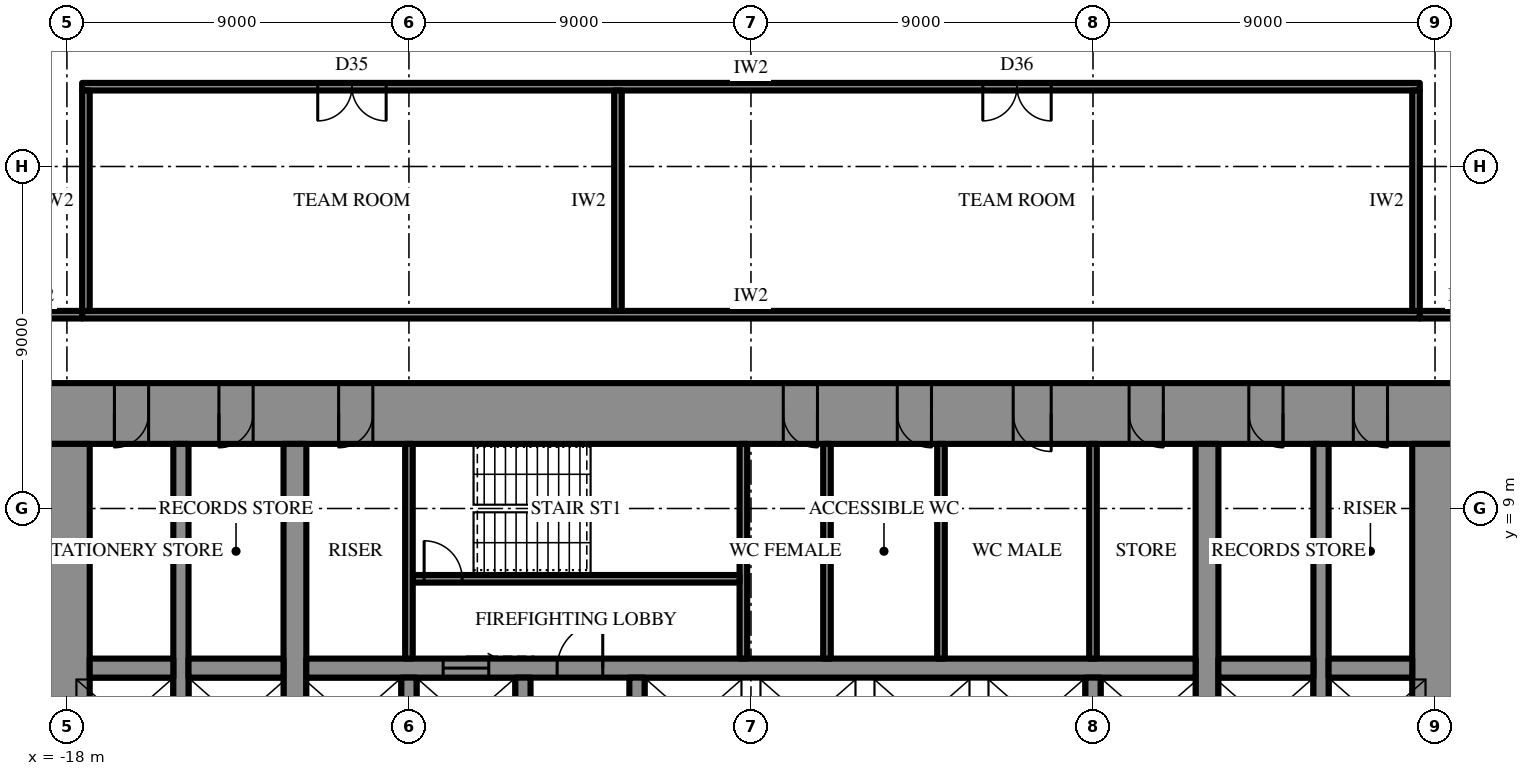
"""IFC4 building model, lengths in metres.
Left out: names, types, materials, properties, quantities, classifications, styles, units other than length and angle.
Written with IfcOpenShell. Run it as: python <this file> out.ifc"""

import sys

from ifc_helpers import new_model, si_unit, direction, frame, frame_2d, origin, place, context, subcontext, project, spatial, rectangle, extrude, element, fill, save


model = new_model("IFC4")
c1 = context("Model", 3, precision=1e-05, world=origin(), true_north=direction((0.0, 1.0)))
c2 = subcontext(c1, "Body", "Model", "MODEL_VIEW")
j1 = project(units=[si_unit("LENGTHUNIT", "METRE"), si_unit("PLANEANGLEUNIT", "RADIAN")], contexts=[c1])
p1 = place(None, origin())
s1 = spatial("IfcSite", under=j1, at=p1, CompositionType="ELEMENT")
p2 = place(p1, origin())
s2 = spatial("IfcBuilding", under=s1, at=p2, CompositionType="ELEMENT")
p3 = place(p2, frame((0.0, 0.0, 23.5)))
s3 = spatial("IfcBuildingStorey", under=s2, at=p3, CompositionType="ELEMENT", Elevation=23.5)
p4 = place(p3, frame((-18.6, 11.5, 0.0), z_axis=(0.0, 0.0, 1.0), x_axis=(1.0, 0.0, 0.0)))
e1 = element("IfcWall", 1, at=p4, inside=s3, PredefinedType="SHEAR", context=c2, shape_type="SweptSolid", body=[
    extrude(rectangle(XDim=37.2, YDim=1.6, at=frame_2d((18.6, 0.0))), origin(), (0.0, 0.0, 1.0), 4.2),
])
p5 = place(p4, frame((19.45, 0.0, 0.0)))
e2 = element("IfcOpeningElement", 2, at=p5, cuts=e1, PredefinedType="OPENING", context=c2, shape_type="SweptSolid", body=[
    extrude(rectangle(XDim=0.9, YDim=2.2, at=frame_2d((0.45, 1.1))), frame((0.0, 0.81, 0.0), z_axis=(0.0, -1.0, 0.0), x_axis=(1.0, 0.0, 0.0)), (0.0, 0.0, 1.0), 1.62),
])
p6 = place(p4, frame((22.45, 0.0, 0.0)))
e3 = element("IfcOpeningElement", 3, at=p6, cuts=e1, PredefinedType="OPENING", context=c2, shape_type="SweptSolid", body=[
    extrude(rectangle(XDim=0.9, YDim=2.2, at=frame_2d((0.45, 1.1))), frame((0.0, 0.81, 0.0), z_axis=(0.0, -1.0, 0.0), x_axis=(1.0, 0.0, 0.0)), (0.0, 0.0, 1.0), 1.62),
])
p7 = place(p4, frame((25.5, 0.0, 0.0)))
e4 = element("IfcOpeningElement", 4, at=p7, cuts=e1, PredefinedType="OPENING", context=c2, shape_type="SweptSolid", body=[
    extrude(rectangle(XDim=1.0, YDim=2.2, at=frame_2d((0.5, 1.1))), frame((0.0, 0.81, 0.0), z_axis=(0.0, -1.0, 0.0), x_axis=(1.0, 0.0, 0.0)), (0.0, 0.0, 1.0), 1.62),
])
p8 = place(p4, frame((1.85, 0.0, 0.0)))
e5 = element("IfcOpeningElement", 5, at=p8, cuts=e1, PredefinedType="OPENING", context=c2, shape_type="SweptSolid", body=[
    extrude(rectangle(XDim=0.9, YDim=2.2, at=frame_2d((0.45, 1.1))), frame((0.0, 0.81, 0.0), z_axis=(0.0, -1.0, 0.0), x_axis=(1.0, 0.0, 0.0)), (0.0, 0.0, 1.0), 1.62),
])
p9 = place(p4, frame((4.6, 0.0, 0.0)))
e6 = element("IfcOpeningElement", 6, at=p9, cuts=e1, PredefinedType="OPENING", context=c2, shape_type="SweptSolid", body=[
    extrude(rectangle(XDim=0.9, YDim=2.2, at=frame_2d((0.45, 1.1))), frame((0.0, 0.81, 0.0), z_axis=(0.0, -1.0, 0.0), x_axis=(1.0, 0.0, 0.0)), (0.0, 0.0, 1.0), 1.62),
])
p10 = place(p4, frame((7.75, 0.0, 0.0)))
e7 = element("IfcOpeningElement", 7, at=p10, cuts=e1, PredefinedType="OPENING", context=c2, shape_type="SweptSolid", body=[
    extrude(rectangle(XDim=0.9, YDim=2.2, at=frame_2d((0.45, 1.1))), frame((0.0, 0.81, 0.0), z_axis=(0.0, -1.0, 0.0), x_axis=(1.0, 0.0, 0.0)), (0.0, 0.0, 1.0), 1.62),
])
p11 = place(p4, frame((28.55, 0.0, 0.0)))
e8 = element("IfcOpeningElement", 8, at=p11, cuts=e1, PredefinedType="OPENING", context=c2, shape_type="SweptSolid", body=[
    extrude(rectangle(XDim=0.9, YDim=2.2, at=frame_2d((0.45, 1.1))), frame((0.0, 0.81, 0.0), z_axis=(0.0, -1.0, 0.0), x_axis=(1.0, 0.0, 0.0)), (0.0, 0.0, 1.0), 1.62),
])
p12 = place(p4, frame((31.7, 0.0, 0.0)))
e9 = element("IfcOpeningElement", 9, at=p12, cuts=e1, PredefinedType="OPENING", context=c2, shape_type="SweptSolid", body=[
    extrude(rectangle(XDim=0.9, YDim=2.2, at=frame_2d((0.45, 1.1))), frame((0.0, 0.81, 0.0), z_axis=(0.0, -1.0, 0.0), x_axis=(1.0, 0.0, 0.0)), (0.0, 0.0, 1.0), 1.62),
])
p13 = place(p4, frame((34.45, 0.0, 0.0)))
e10 = element("IfcOpeningElement", 10, at=p13, cuts=e1, PredefinedType="OPENING", context=c2, shape_type="SweptSolid", body=[
    extrude(rectangle(XDim=0.9, YDim=2.2, at=frame_2d((0.45, 1.1))), frame((0.0, 0.81, 0.0), z_axis=(0.0, -1.0, 0.0), x_axis=(1.0, 0.0, 0.0)), (0.0, 0.0, 1.0), 1.62),
])
p14 = place(p3, frame((18.0, -10.7, 0.0), z_axis=(0.0, 0.0, 1.0), x_axis=(0.0, 1.0, 0.0)))
e11 = element("IfcWall", 11, at=p14, inside=s3, PredefinedType="SHEAR", context=c2, shape_type="SweptSolid", body=[
    extrude(rectangle(XDim=21.4, YDim=1.2, at=frame_2d((10.7, 0.0))), origin(), (0.0, 0.0, 1.0), 4.2),
])
p15 = place(p14, frame((9.8, 0.0, 0.0)))
e12 = element("IfcOpeningElement", 12, at=p15, cuts=e11, PredefinedType="OPENING", context=c2, shape_type="SweptSolid", body=[
    extrude(rectangle(XDim=1.8, YDim=2.4, at=frame_2d((0.9, 1.2))), frame((0.0, 0.61, 0.0), z_axis=(0.0, -1.0, 0.0), x_axis=(1.0, 0.0, 0.0)), (0.0, 0.0, 1.0), 1.22),
])
p16 = place(p3, frame((-18.0, 10.7, 0.0), z_axis=(0.0, 0.0, 1.0), x_axis=(0.0, -1.0, 0.0)))
e13 = element("IfcWall", 13, at=p16, inside=s3, PredefinedType="SHEAR", context=c2, shape_type="SweptSolid", body=[
    extrude(rectangle(XDim=21.4, YDim=1.2, at=frame_2d((10.7, 0.0))), origin(), (0.0, 0.0, 1.0), 4.2),
])
p17 = place(p16, frame((9.8, 0.0, 0.0)))
e14 = element("IfcOpeningElement", 14, at=p17, cuts=e13, PredefinedType="OPENING", context=c2, shape_type="SweptSolid", body=[
    extrude(rectangle(XDim=1.8, YDim=2.4, at=frame_2d((0.9, 1.2))), frame((0.0, 0.61, 0.0), z_axis=(0.0, -1.0, 0.0), x_axis=(1.0, 0.0, 0.0)), (0.0, 0.0, 1.0), 1.22),
])
p18 = place(p3, frame((12.0, -10.7, 0.0), z_axis=(0.0, 0.0, 1.0), x_axis=(0.0, 1.0, 0.0)))
e15 = element("IfcWall", 15, at=p18, inside=s3, PredefinedType="SHEAR", context=c2, shape_type="SweptSolid", body=[
    extrude(rectangle(XDim=21.4, YDim=0.6, at=frame_2d((10.7, 0.0))), origin(), (0.0, 0.0, 1.0), 4.2),
])
p19 = place(p18, frame((9.8, 0.0, 0.0)))
e16 = element("IfcOpeningElement", 16, at=p19, cuts=e15, PredefinedType="OPENING", context=c2, shape_type="SweptSolid", body=[
    extrude(rectangle(XDim=1.8, YDim=2.4, at=frame_2d((0.9, 1.2))), frame((0.0, 0.31, 0.0), z_axis=(0.0, -1.0, 0.0), x_axis=(1.0, 0.0, 0.0)), (0.0, 0.0, 1.0), 0.62),
])
p20 = place(p3, frame((-12.0, -10.7, 0.0), z_axis=(0.0, 0.0, 1.0), x_axis=(0.0, 1.0, 0.0)))
e17 = element("IfcWall", 17, at=p20, inside=s3, PredefinedType="SHEAR", context=c2, shape_type="SweptSolid", body=[
    extrude(rectangle(XDim=21.4, YDim=0.6, at=frame_2d((10.7, 0.0))), origin(), (0.0, 0.0, 1.0), 4.2),
])
p21 = place(p20, frame((9.8, 0.0, 0.0)))
e18 = element("IfcOpeningElement", 18, at=p21, cuts=e17, PredefinedType="OPENING", context=c2, shape_type="SweptSolid", body=[
    extrude(rectangle(XDim=1.8, YDim=2.4, at=frame_2d((0.9, 1.2))), frame((0.0, 0.31, 0.0), z_axis=(0.0, -1.0, 0.0), x_axis=(1.0, 0.0, 0.0)), (0.0, 0.0, 1.0), 0.62),
])
p22 = place(p3, frame((15.0, -10.7, 0.0), z_axis=(0.0, 0.0, 1.0), x_axis=(0.0, 1.0, 0.0)))
e19 = element("IfcWall", 19, at=p22, inside=s3, PredefinedType="SHEAR", context=c2, shape_type="SweptSolid", body=[
    extrude(rectangle(XDim=21.4, YDim=0.4, at=frame_2d((10.7, 0.0))), origin(), (0.0, 0.0, 1.0), 4.2),
])
p23 = place(p22, frame((9.8, 0.0, 0.0)))
e20 = element("IfcOpeningElement", 20, at=p23, cuts=e19, PredefinedType="OPENING", context=c2, shape_type="SweptSolid", body=[
    extrude(rectangle(XDim=1.8, YDim=2.4, at=frame_2d((0.9, 1.2))), frame((0.0, 0.21, 0.0), z_axis=(0.0, -1.0, 0.0), x_axis=(1.0, 0.0, 0.0)), (0.0, 0.0, 1.0), 0.42),
])
p24 = place(p3, frame((-15.0, -10.7, 0.0), z_axis=(0.0, 0.0, 1.0), x_axis=(0.0, 1.0, 0.0)))
e21 = element("IfcWall", 21, at=p24, inside=s3, PredefinedType="SHEAR", context=c2, shape_type="SweptSolid", body=[
    extrude(rectangle(XDim=21.4, YDim=0.4, at=frame_2d((10.7, 0.0))), origin(), (0.0, 0.0, 1.0), 4.2),
])
p25 = place(p24, frame((9.8, 0.0, 0.0)))
e22 = element("IfcOpeningElement", 22, at=p25, cuts=e21, PredefinedType="OPENING", context=c2, shape_type="SweptSolid", body=[
    extrude(rectangle(XDim=1.8, YDim=2.4, at=frame_2d((0.9, 1.2))), frame((0.0, 0.21, 0.0), z_axis=(0.0, -1.0, 0.0), x_axis=(1.0, 0.0, 0.0)), (0.0, 0.0, 1.0), 0.42),
])
p26 = place(p3, frame((-17.4, 4.8, 0.0), z_axis=(0.0, 0.0, 1.0), x_axis=(1.0, 0.0, 0.0)))
e23 = element("IfcWall", 23, at=p26, inside=s3, PredefinedType="SHEAR", context=c2, shape_type="SweptSolid", body=[
    extrude(rectangle(XDim=2.2, YDim=0.5, at=frame_2d((1.1, 0.0))), origin(), (0.0, 0.0, 1.0), 4.2),
])
p27 = place(p3, frame((-14.8, 4.8, 0.0), z_axis=(0.0, 0.0, 1.0), x_axis=(1.0, 0.0, 0.0)))
e24 = element("IfcWall", 24, at=p27, inside=s3, PredefinedType="SHEAR", context=c2, shape_type="SweptSolid", body=[
    extrude(rectangle(XDim=2.5, YDim=0.5, at=frame_2d((1.25, 0.0))), origin(), (0.0, 0.0, 1.0), 4.2),
])
p28 = place(p3, frame((-11.7, 4.8, 0.0), z_axis=(0.0, 0.0, 1.0), x_axis=(1.0, 0.0, 0.0)))
e25 = element("IfcWall", 25, at=p28, inside=s3, PredefinedType="SHEAR", context=c2, shape_type="SweptSolid", body=[
    extrude(rectangle(XDim=23.4, YDim=0.5, at=frame_2d((11.7, 0.0))), origin(), (0.0, 0.0, 1.0), 4.2),
])
p29 = place(p28, frame((6.6, 0.0, 0.0)))
e26 = element("IfcOpeningElement", 26, at=p29, cuts=e25, PredefinedType="OPENING", context=c2, shape_type="SweptSolid", body=[
    extrude(rectangle(XDim=1.2, YDim=2.2, at=frame_2d((0.6, 1.1))), frame((0.0, 0.26, 0.0), z_axis=(0.0, -1.0, 0.0), x_axis=(1.0, 0.0, 0.0)), (0.0, 0.0, 1.0), 0.52),
])
p30 = place(p28, frame((3.6, 0.0, 0.0)))
e27 = element("IfcOpeningElement", 27, at=p30, cuts=e25, PredefinedType="OPENING", context=c2, shape_type="SweptSolid", body=[
    extrude(rectangle(XDim=1.2, YDim=2.2, at=frame_2d((0.6, 1.1))), frame((0.0, 0.26, 0.0), z_axis=(0.0, -1.0, 0.0), x_axis=(1.0, 0.0, 0.0)), (0.0, 0.0, 1.0), 0.52),
])
p31 = place(p3, frame((12.3, 4.8, 0.0), z_axis=(0.0, 0.0, 1.0), x_axis=(1.0, 0.0, 0.0)))
e28 = element("IfcWall", 28, at=p31, inside=s3, PredefinedType="SHEAR", context=c2, shape_type="SweptSolid", body=[
    extrude(rectangle(XDim=2.5, YDim=0.5, at=frame_2d((1.25, 0.0))), origin(), (0.0, 0.0, 1.0), 4.2),
])
p32 = place(p3, frame((15.2, 4.8, 0.0), z_axis=(0.0, 0.0, 1.0), x_axis=(1.0, 0.0, 0.0)))
e29 = element("IfcWall", 29, at=p32, inside=s3, PredefinedType="SHEAR", context=c2, shape_type="SweptSolid", body=[
    extrude(rectangle(XDim=2.2, YDim=0.5, at=frame_2d((1.1, 0.0))), origin(), (0.0, 0.0, 1.0), 4.2),
])
for number, where, z_axis, x_axis in (
    (30, (-9.0, 2.25, 0.0), (0.0, 0.0, 1.0), (0.0, 1.0, 0.0)),
    (31, (-6.0, 2.25, 0.0), (0.0, 0.0, 1.0), (0.0, 1.0, 0.0)),
    (32, (-3.0, 2.25, 0.0), (0.0, 0.0, 1.0), (0.0, 1.0, 0.0)),
    (33, (9.0, 2.25, 0.0), (0.0, 0.0, 1.0), (0.0, 1.0, 0.0)),
):
    element("IfcWall", number, at=place(p3, frame(where, z_axis=z_axis, x_axis=x_axis)), inside=s3, PredefinedType="SHEAR", context=c2, shape_type="SweptSolid", body=[
        extrude(rectangle(XDim=2.3, YDim=0.4, at=frame_2d((1.15, 0.0))), origin(), (0.0, 0.0, 1.0), 4.2),
    ])
p33 = place(p3, frame((-0.2, 5.05, 0.0), z_axis=(0.0, 0.0, 1.0), x_axis=(0.0, 1.0, 0.0)))
e34 = element("IfcWall", 34, at=p33, inside=s3, PredefinedType="SHEAR", context=c2, shape_type="SweptSolid", body=[
    extrude(rectangle(XDim=5.65, YDim=0.2, at=frame_2d((2.825, 0.0))), origin(), (0.0, 0.0, 1.0), 4.2),
])
p34 = place(p3, frame((-8.9, 7.15, 0.0), z_axis=(0.0, 0.0, 1.0), x_axis=(1.0, 0.0, 0.0)))
e35 = element("IfcWall", 35, at=p34, inside=s3, PredefinedType="SHEAR", context=c2, shape_type="SweptSolid", body=[
    extrude(rectangle(XDim=8.6, YDim=0.2, at=frame_2d((4.3, 0.0))), origin(), (0.0, 0.0, 1.0), 4.2),
])
p35 = place(p34, frame((0.3, 0.0, 0.0)))
e36 = element("IfcOpeningElement", 36, at=p35, cuts=e35, PredefinedType="OPENING", context=c2, shape_type="SweptSolid", body=[
    extrude(rectangle(XDim=1.0, YDim=2.2, at=frame_2d((0.5, 1.1))), frame((0.0, 0.11, 0.0), z_axis=(0.0, -1.0, 0.0), x_axis=(1.0, 0.0, 0.0)), (0.0, 0.0, 1.0), 0.22),
])
for number, where, z_axis, x_axis in (
    (37, (-9.0, 5.05, 0.0), (0.0, 0.0, 1.0), (0.0, 1.0, 0.0)),
    (38, (9.0, 5.05, 0.0), (0.0, 0.0, 1.0), (0.0, 1.0, 0.0)),
    (39, (2.0, 5.05, 0.0), (0.0, 0.0, 1.0), (0.0, 1.0, 0.0)),
    (40, (5.0, 5.05, 0.0), (0.0, 0.0, 1.0), (0.0, 1.0, 0.0)),
):
    element("IfcWall", number, at=place(p3, frame(where, z_axis=z_axis, x_axis=x_axis)), inside=s3, PredefinedType="PARTITIONING", context=c2, shape_type="SweptSolid", body=[
        extrude(rectangle(XDim=5.65, YDim=0.2, at=frame_2d((2.825, 0.0))), origin(), (0.0, 0.0, 1.0), 4.0),
    ])
p36 = place(p3, frame((-17.6, 14.1, 0.0), z_axis=(0.0, 0.0, 1.0), x_axis=(1.0, 0.0, 0.0)))
e41 = element("IfcWall", 41, at=p36, inside=s3, PredefinedType="PARTITIONING", context=c2, shape_type="SweptSolid", body=[
    extrude(rectangle(XDim=35.2, YDim=0.2, at=frame_2d((17.6, 0.0))), origin(), (0.0, 0.0, 1.0), 4.0),
])
p37 = place(p3, frame((-17.6, 20.1, 0.0), z_axis=(0.0, 0.0, 1.0), x_axis=(1.0, 0.0, 0.0)))
e42 = element("IfcWall", 42, at=p37, inside=s3, PredefinedType="PARTITIONING", context=c2, shape_type="SweptSolid", body=[
    extrude(rectangle(XDim=35.2, YDim=0.2, at=frame_2d((17.6, 0.0))), origin(), (0.0, 0.0, 1.0), 4.0),
])
p38 = place(p37, frame((6.2, 0.0, 0.0)))
e43 = element("IfcOpeningElement", 43, at=p38, cuts=e42, PredefinedType="OPENING", context=c2, shape_type="SweptSolid", body=[
    extrude(rectangle(XDim=1.8, YDim=2.4, at=frame_2d((0.9, 1.2))), frame((0.0, 0.11, 0.0), z_axis=(0.0, -1.0, 0.0), x_axis=(1.0, 0.0, 0.0)), (0.0, 0.0, 1.0), 0.22),
])
p39 = place(p37, frame((23.7, 0.0, 0.0)))
e44 = element("IfcOpeningElement", 44, at=p39, cuts=e42, PredefinedType="OPENING", context=c2, shape_type="SweptSolid", body=[
    extrude(rectangle(XDim=1.8, YDim=2.4, at=frame_2d((0.9, 1.2))), frame((0.0, 0.11, 0.0), z_axis=(0.0, -1.0, 0.0), x_axis=(1.0, 0.0, 0.0)), (0.0, 0.0, 1.0), 0.22),
])
for number, where, z_axis, x_axis in (
    (45, (-17.5, 14.2, 0.0), (0.0, 0.0, 1.0), (0.0, 1.0, 0.0)),
    (46, (-3.5, 14.2, 0.0), (0.0, 0.0, 1.0), (0.0, 1.0, 0.0)),
    (47, (17.5, 14.2, 0.0), (0.0, 0.0, 1.0), (0.0, 1.0, 0.0)),
):
    element("IfcWall", number, at=place(p3, frame(where, z_axis=z_axis, x_axis=x_axis)), inside=s3, PredefinedType="PARTITIONING", context=c2, shape_type="SweptSolid", body=[
        extrude(rectangle(XDim=5.8, YDim=0.2, at=frame_2d((2.9, 0.0))), origin(), (0.0, 0.0, 1.0), 4.0),
    ])
for number, where, z_axis, x_axis in (
    (48, (-20.0, 14.1, 0.0), (0.0, 0.0, 1.0), (1.0, 0.0, 0.0)),
    (49, (17.6, 14.1, 0.0), (0.0, 0.0, 1.0), (1.0, 0.0, 0.0)),
):
    element("IfcWall", number, at=place(p3, frame(where, z_axis=z_axis, x_axis=x_axis)), inside=s3, PredefinedType="PARTITIONING", context=c2, shape_type="SweptSolid", body=[
        extrude(rectangle(XDim=2.4, YDim=0.2, at=frame_2d((1.2, 0.0))), origin(), (0.0, 0.0, 1.0), 4.0),
    ])
p40 = place(p29, origin())
e50 = element("IfcDoor", 50, at=p40, inside=s3, OperationType="SINGLE_SWING_LEFT", PredefinedType="DOOR", context=c2, shape_type="SweptSolid", body=[
    extrude(rectangle(XDim=1.2, YDim=2.2, at=frame_2d((0.6, 1.1))), frame((0.0, 0.025, 0.0), z_axis=(0.0, -1.0, 0.0), x_axis=(1.0, 0.0, 0.0)), (0.0, 0.0, 1.0), 0.05),
])
fill(e26, e50)
p41 = place(p35, origin())
e51 = element("IfcDoor", 51, at=p41, inside=s3, OperationType="SINGLE_SWING_RIGHT", PredefinedType="DOOR", context=c2, shape_type="SweptSolid", body=[
    extrude(rectangle(XDim=1.0, YDim=2.2, at=frame_2d((0.5, 1.1))), frame((0.0, 0.025, 0.0), z_axis=(0.0, -1.0, 0.0), x_axis=(1.0, 0.0, 0.0)), (0.0, 0.0, 1.0), 0.05),
])
fill(e36, e51)
p42 = place(p5, frame((0.9, 0.0, 0.0), z_axis=(0.0, 0.0, 1.0), x_axis=(-1.0, 0.0, 0.0)))
e52 = element("IfcDoor", 52, at=p42, inside=s3, OperationType="SINGLE_SWING_RIGHT", PredefinedType="DOOR", context=c2, shape_type="SweptSolid", body=[
    extrude(rectangle(XDim=0.9, YDim=2.2, at=frame_2d((0.45, 1.1))), frame((0.0, 0.025, 0.0), z_axis=(0.0, -1.0, 0.0), x_axis=(1.0, 0.0, 0.0)), (0.0, 0.0, 1.0), 0.05),
])
fill(e2, e52)
p43 = place(p6, frame((0.9, 0.0, 0.0), z_axis=(0.0, 0.0, 1.0), x_axis=(-1.0, 0.0, 0.0)))
e53 = element("IfcDoor", 53, at=p43, inside=s3, OperationType="SINGLE_SWING_RIGHT", PredefinedType="DOOR", context=c2, shape_type="SweptSolid", body=[
    extrude(rectangle(XDim=0.9, YDim=2.2, at=frame_2d((0.45, 1.1))), frame((0.0, 0.025, 0.0), z_axis=(0.0, -1.0, 0.0), x_axis=(1.0, 0.0, 0.0)), (0.0, 0.0, 1.0), 0.05),
])
fill(e3, e53)
p44 = place(p7, frame((1.0, 0.0, 0.0), z_axis=(0.0, 0.0, 1.0), x_axis=(-1.0, 0.0, 0.0)))
e54 = element("IfcDoor", 54, at=p44, inside=s3, OperationType="SINGLE_SWING_RIGHT", PredefinedType="DOOR", context=c2, shape_type="SweptSolid", body=[
    extrude(rectangle(XDim=1.0, YDim=2.2, at=frame_2d((0.5, 1.1))), frame((0.0, 0.025, 0.0), z_axis=(0.0, -1.0, 0.0), x_axis=(1.0, 0.0, 0.0)), (0.0, 0.0, 1.0), 0.05),
])
fill(e4, e54)
p45 = place(p8, frame((0.9, 0.0, 0.0), z_axis=(0.0, 0.0, 1.0), x_axis=(-1.0, 0.0, 0.0)))
e55 = element("IfcDoor", 55, at=p45, inside=s3, OperationType="SINGLE_SWING_LEFT", PredefinedType="DOOR", context=c2, shape_type="SweptSolid", body=[
    extrude(rectangle(XDim=0.9, YDim=2.2, at=frame_2d((0.45, 1.1))), frame((0.0, 0.025, 0.0), z_axis=(0.0, -1.0, 0.0), x_axis=(1.0, 0.0, 0.0)), (0.0, 0.0, 1.0), 0.05),
])
fill(e5, e55)
p46 = place(p9, frame((0.9, 0.0, 0.0), z_axis=(0.0, 0.0, 1.0), x_axis=(-1.0, 0.0, 0.0)))
e56 = element("IfcDoor", 56, at=p46, inside=s3, OperationType="SINGLE_SWING_LEFT", PredefinedType="DOOR", context=c2, shape_type="SweptSolid", body=[
    extrude(rectangle(XDim=0.9, YDim=2.2, at=frame_2d((0.45, 1.1))), frame((0.0, 0.025, 0.0), z_axis=(0.0, -1.0, 0.0), x_axis=(1.0, 0.0, 0.0)), (0.0, 0.0, 1.0), 0.05),
])
fill(e6, e56)
p47 = place(p10, frame((0.9, 0.0, 0.0), z_axis=(0.0, 0.0, 1.0), x_axis=(-1.0, 0.0, 0.0)))
e57 = element("IfcDoor", 57, at=p47, inside=s3, OperationType="SINGLE_SWING_LEFT", PredefinedType="DOOR", context=c2, shape_type="SweptSolid", body=[
    extrude(rectangle(XDim=0.9, YDim=2.2, at=frame_2d((0.45, 1.1))), frame((0.0, 0.025, 0.0), z_axis=(0.0, -1.0, 0.0), x_axis=(1.0, 0.0, 0.0)), (0.0, 0.0, 1.0), 0.05),
])
fill(e7, e57)
p48 = place(p11, frame((0.9, 0.0, 0.0), z_axis=(0.0, 0.0, 1.0), x_axis=(-1.0, 0.0, 0.0)))
e58 = element("IfcDoor", 58, at=p48, inside=s3, OperationType="SINGLE_SWING_RIGHT", PredefinedType="DOOR", context=c2, shape_type="SweptSolid", body=[
    extrude(rectangle(XDim=0.9, YDim=2.2, at=frame_2d((0.45, 1.1))), frame((0.0, 0.025, 0.0), z_axis=(0.0, -1.0, 0.0), x_axis=(1.0, 0.0, 0.0)), (0.0, 0.0, 1.0), 0.05),
])
fill(e8, e58)
p49 = place(p12, frame((0.9, 0.0, 0.0), z_axis=(0.0, 0.0, 1.0), x_axis=(-1.0, 0.0, 0.0)))
e59 = element("IfcDoor", 59, at=p49, inside=s3, OperationType="SINGLE_SWING_RIGHT", PredefinedType="DOOR", context=c2, shape_type="SweptSolid", body=[
    extrude(rectangle(XDim=0.9, YDim=2.2, at=frame_2d((0.45, 1.1))), frame((0.0, 0.025, 0.0), z_axis=(0.0, -1.0, 0.0), x_axis=(1.0, 0.0, 0.0)), (0.0, 0.0, 1.0), 0.05),
])
fill(e9, e59)
p50 = place(p13, frame((0.9, 0.0, 0.0), z_axis=(0.0, 0.0, 1.0), x_axis=(-1.0, 0.0, 0.0)))
e60 = element("IfcDoor", 60, at=p50, inside=s3, OperationType="SINGLE_SWING_RIGHT", PredefinedType="DOOR", context=c2, shape_type="SweptSolid", body=[
    extrude(rectangle(XDim=0.9, YDim=2.2, at=frame_2d((0.45, 1.1))), frame((0.0, 0.025, 0.0), z_axis=(0.0, -1.0, 0.0), x_axis=(1.0, 0.0, 0.0)), (0.0, 0.0, 1.0), 0.05),
])
fill(e10, e60)
p51 = place(p30, origin())
e61 = element("IfcDoor", 61, at=p51, inside=s3, OperationType="SLIDING_TO_LEFT", PredefinedType="DOOR", context=c2, shape_type="SweptSolid", body=[
    extrude(rectangle(XDim=1.2, YDim=2.2, at=frame_2d((0.6, 1.1))), frame((0.0, 0.025, 0.0), z_axis=(0.0, -1.0, 0.0), x_axis=(1.0, 0.0, 0.0)), (0.0, 0.0, 1.0), 0.05),
])
fill(e27, e61)
p52 = place(p38, frame((1.8, 0.0, 0.0), z_axis=(0.0, 0.0, 1.0), x_axis=(-1.0, 0.0, 0.0)))
e62 = element("IfcDoor", 62, at=p52, inside=s3, OperationType="DOUBLE_DOOR_SINGLE_SWING", PredefinedType="DOOR", context=c2, shape_type="SweptSolid", body=[
    extrude(rectangle(XDim=1.8, YDim=2.4, at=frame_2d((0.9, 1.2))), frame((0.0, 0.025, 0.0), z_axis=(0.0, -1.0, 0.0), x_axis=(1.0, 0.0, 0.0)), (0.0, 0.0, 1.0), 0.05),
])
fill(e43, e62)
p53 = place(p39, frame((1.8, 0.0, 0.0), z_axis=(0.0, 0.0, 1.0), x_axis=(-1.0, 0.0, 0.0)))
e63 = element("IfcDoor", 63, at=p53, inside=s3, OperationType="DOUBLE_DOOR_SINGLE_SWING", PredefinedType="DOOR", context=c2, shape_type="SweptSolid", body=[
    extrude(rectangle(XDim=1.8, YDim=2.4, at=frame_2d((0.9, 1.2))), frame((0.0, 0.025, 0.0), z_axis=(0.0, -1.0, 0.0), x_axis=(1.0, 0.0, 0.0)), (0.0, 0.0, 1.0), 0.05),
])
fill(e44, e63)
save(model, sys.argv[1])
